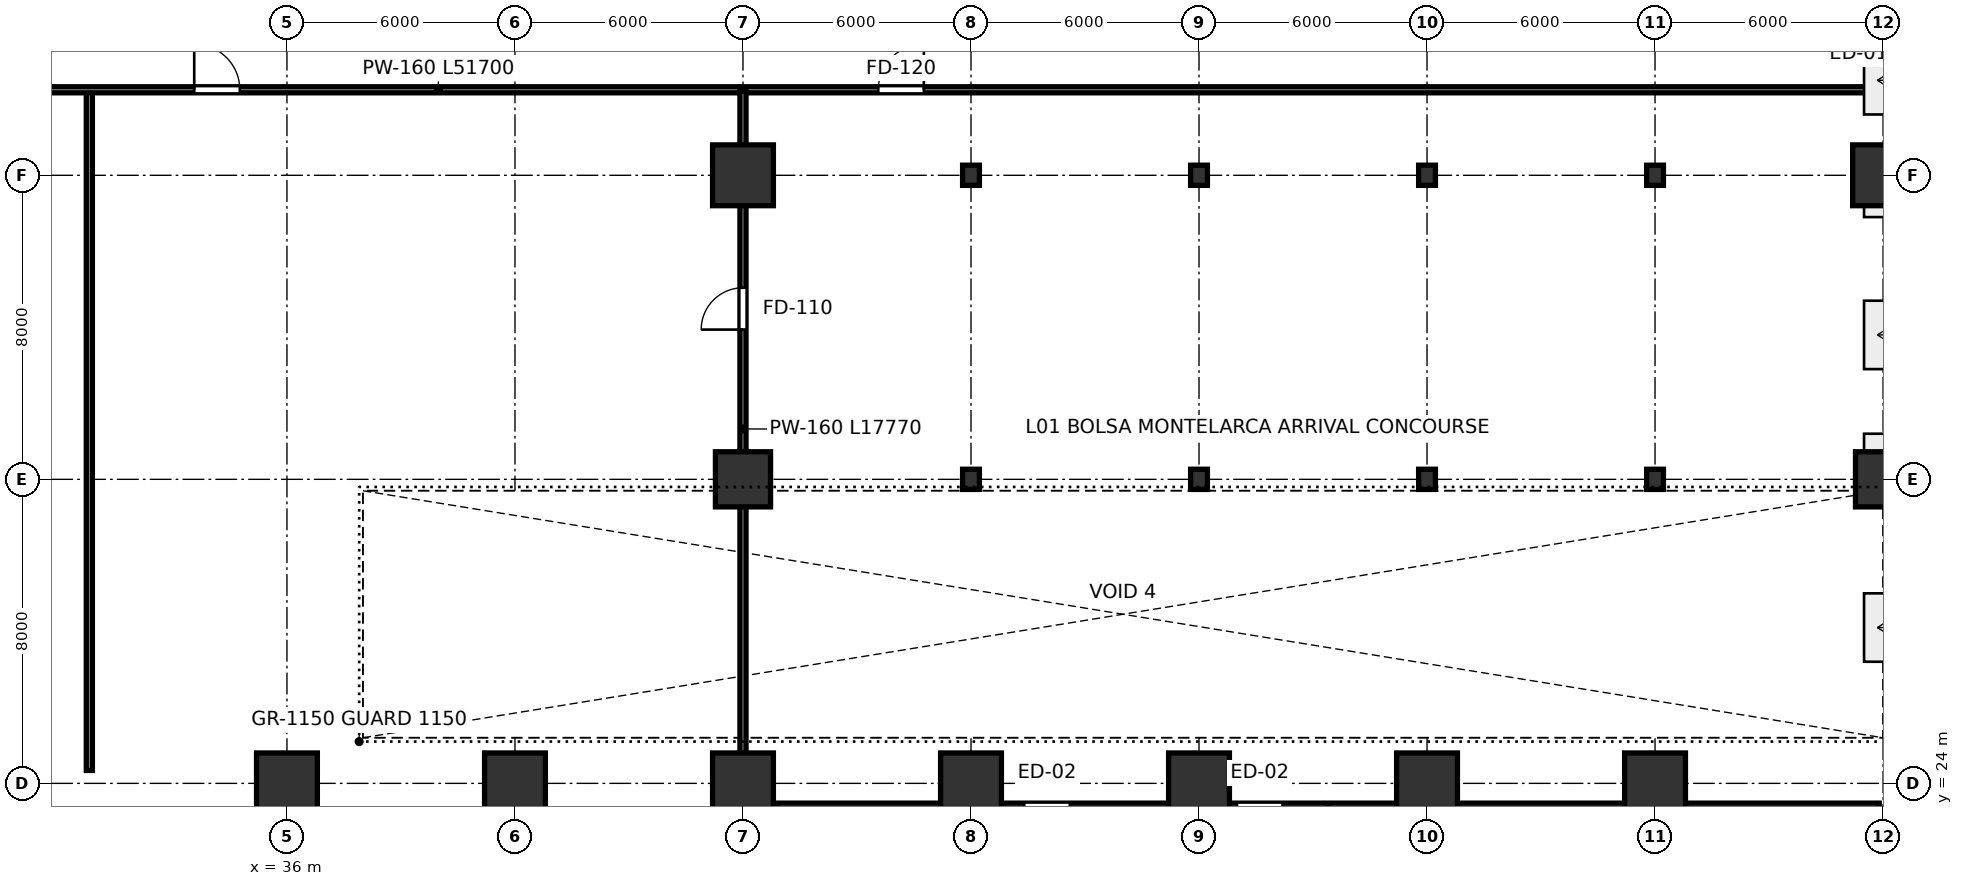
"""IFC4 building model, lengths in metres.
Left out: names, types, materials, properties, quantities, classifications, styles, units other than length and angle.
Written with IfcOpenShell. Run it as: python <this file> out.ifc"""

import sys

from ifc_helpers import new_model, si_unit, direction, frame, frame_2d, origin, origin_2d, place, context, subcontext, project, spatial, rectangle, i_section, extrude, source, transform, mapped, element, fill, save


model = new_model("IFC4")
c1 = context("Model", 3, precision=1e-05, world=origin(), true_north=direction((0.0, 1.0)))
c2 = subcontext(c1, "Body", "Model", "MODEL_VIEW")
j1 = project(units=[si_unit("LENGTHUNIT", "METRE"), si_unit("PLANEANGLEUNIT", "RADIAN")], contexts=[c1])
p1 = place(None, origin())
s1 = spatial("IfcSite", under=j1, at=p1, CompositionType="ELEMENT")
p2 = place(p1, origin())
s2 = spatial("IfcBuilding", under=s1, at=p2, CompositionType="ELEMENT")
p3 = place(p2, origin())
s3 = spatial("IfcBuildingStorey", under=s2, at=p3, CompositionType="ELEMENT", Elevation=0.0)
m1 = source(origin(), c2, "Body", "SweptSolid", [
    extrude(rectangle(XDim=1.6, YDim=1.6, at=origin_2d()), origin(), (0.0, 0.0, 1.0), 5.999),
])
for number, where, z_axis, x_axis in (
    (1, (36.0, 24.0, 0.001), (0.0, 0.0, 1.0), (1.0, 0.0, 0.0)),
    (2, (42.0, 24.0, 0.001), (0.0, 0.0, 1.0), (1.0, 0.0, 0.0)),
    (3, (48.0, 24.0, 0.001), (0.0, 0.0, 1.0), (1.0, 0.0, 0.0)),
):
    element("IfcColumn", number, at=place(p3, frame(where, z_axis=z_axis, x_axis=x_axis)), inside=s3, PredefinedType="COLUMN", context=c2, shape_type="MappedRepresentation", body=[
        mapped(m1, transform((0.0, 0.0, 0.0), scale=1.0)),
    ])
m2 = source(origin(), c2, "Body", "SweptSolid", [
    extrude(rectangle(XDim=1.45, YDim=1.45, at=origin_2d()), origin(), (0.0, 0.0, 1.0), 5.999),
])
p4 = place(p3, frame((48.0, 32.0, 0.001), z_axis=(0.0, 0.0, 1.0), x_axis=(1.0, 0.0, 0.0)))
e4 = element("IfcColumn", 4, at=p4, inside=s3, PredefinedType="COLUMN", context=c2, shape_type="MappedRepresentation", body=[
    mapped(m2, transform((0.0, 0.0, 0.0), scale=1.0)),
])
m3 = source(origin(), c2, "Body", "SweptSolid", [
    extrude(rectangle(XDim=1.6, YDim=1.6, at=origin_2d()), origin(), (0.0, 0.0, 1.0), 5.999),
])
p5 = place(p3, frame((48.0, 40.0, 0.001), z_axis=(0.0, 0.0, 1.0), x_axis=(1.0, 0.0, 0.0)))
e5 = element("IfcColumn", 5, at=p5, inside=s3, PredefinedType="COLUMN", context=c2, shape_type="MappedRepresentation", body=[
    mapped(m3, transform((0.0, 0.0, 0.0), scale=1.0)),
])
p6 = place(p3, frame((54.0, 24.0, 0.001), z_axis=(0.0, 0.0, 1.0), x_axis=(1.0, 0.0, 0.0)))
e6 = element("IfcColumn", 6, at=p6, inside=s3, PredefinedType="COLUMN", context=c2, shape_type="MappedRepresentation", body=[
    mapped(m1, transform((0.0, 0.0, 0.0), scale=1.0)),
])
m4 = source(origin(), c2, "Body", "SweptSolid", [
    extrude(i_section(OverallWidth=0.442, OverallDepth=0.531, WebThickness=0.066, FlangeThickness=0.106, FilletRadius=0.015, at=origin_2d()), origin(), (0.0, 0.0, 1.0), 5.999),
])
for number, where, z_axis, x_axis in (
    (7, (54.0, 32.0, 0.001), (0.0, 0.0, 1.0), (1.0, 0.0, 0.0)),
    (8, (54.0, 40.0, 0.001), (0.0, 0.0, 1.0), (1.0, 0.0, 0.0)),
):
    element("IfcColumn", number, at=place(p3, frame(where, z_axis=z_axis, x_axis=x_axis)), inside=s3, PredefinedType="COLUMN", context=c2, shape_type="MappedRepresentation", body=[
        mapped(m4, transform((0.0, 0.0, 0.0), scale=1.0)),
    ])
p7 = place(p3, frame((60.0, 24.0, 0.001), z_axis=(0.0, 0.0, 1.0), x_axis=(1.0, 0.0, 0.0)))
e9 = element("IfcColumn", 9, at=p7, inside=s3, PredefinedType="COLUMN", context=c2, shape_type="MappedRepresentation", body=[
    mapped(m1, transform((0.0, 0.0, 0.0), scale=1.0)),
])
for number, where, z_axis, x_axis in (
    (10, (60.0, 32.0, 0.001), (0.0, 0.0, 1.0), (1.0, 0.0, 0.0)),
    (11, (60.0, 40.0, 0.001), (0.0, 0.0, 1.0), (1.0, 0.0, 0.0)),
):
    element("IfcColumn", number, at=place(p3, frame(where, z_axis=z_axis, x_axis=x_axis)), inside=s3, PredefinedType="COLUMN", context=c2, shape_type="MappedRepresentation", body=[
        mapped(m4, transform((0.0, 0.0, 0.0), scale=1.0)),
    ])
p8 = place(p3, frame((66.0, 24.0, 0.001), z_axis=(0.0, 0.0, 1.0), x_axis=(1.0, 0.0, 0.0)))
e12 = element("IfcColumn", 12, at=p8, inside=s3, PredefinedType="COLUMN", context=c2, shape_type="MappedRepresentation", body=[
    mapped(m1, transform((0.0, 0.0, 0.0), scale=1.0)),
])
for number, where, z_axis, x_axis in (
    (13, (66.0, 32.0, 0.001), (0.0, 0.0, 1.0), (1.0, 0.0, 0.0)),
    (14, (66.0, 40.0, 0.001), (0.0, 0.0, 1.0), (1.0, 0.0, 0.0)),
):
    element("IfcColumn", number, at=place(p3, frame(where, z_axis=z_axis, x_axis=x_axis)), inside=s3, PredefinedType="COLUMN", context=c2, shape_type="MappedRepresentation", body=[
        mapped(m4, transform((0.0, 0.0, 0.0), scale=1.0)),
    ])
p9 = place(p3, frame((72.0, 24.0, 0.001), z_axis=(0.0, 0.0, 1.0), x_axis=(1.0, 0.0, 0.0)))
e15 = element("IfcColumn", 15, at=p9, inside=s3, PredefinedType="COLUMN", context=c2, shape_type="MappedRepresentation", body=[
    mapped(m1, transform((0.0, 0.0, 0.0), scale=1.0)),
])
for number, where, z_axis, x_axis in (
    (16, (72.0, 32.0, 0.001), (0.0, 0.0, 1.0), (1.0, 0.0, 0.0)),
    (17, (72.0, 40.0, 0.001), (0.0, 0.0, 1.0), (1.0, 0.0, 0.0)),
):
    element("IfcColumn", number, at=place(p3, frame(where, z_axis=z_axis, x_axis=x_axis)), inside=s3, PredefinedType="COLUMN", context=c2, shape_type="MappedRepresentation", body=[
        mapped(m4, transform((0.0, 0.0, 0.0), scale=1.0)),
    ])
m5 = source(origin(), c2, "Body", "SweptSolid", [
    extrude(rectangle(XDim=1.45, YDim=1.45, at=origin_2d()), origin(), (0.0, 0.0, 1.0), 5.999),
])
p10 = place(p3, frame((78.0, 32.0, 0.001), z_axis=(0.0, 0.0, 1.0), x_axis=(1.0, 0.0, 0.0)))
e18 = element("IfcColumn", 18, at=p10, inside=s3, PredefinedType="COLUMN", context=c2, shape_type="MappedRepresentation", body=[
    mapped(m5, transform((0.0, 0.0, 0.0), scale=1.0)),
])
p11 = place(p3, frame((78.0, 40.0, 0.001), z_axis=(0.0, 0.0, 1.0), x_axis=(1.0, 0.0, 0.0)))
e19 = element("IfcColumn", 19, at=p11, inside=s3, PredefinedType="COLUMN", context=c2, shape_type="MappedRepresentation", body=[
    mapped(m1, transform((0.0, 0.0, 0.0), scale=1.0)),
])
p12 = place(p3, frame((77.9, 23.32, 0.0), z_axis=(0.0, 0.0, 1.0), x_axis=(-1.0, 0.0, 0.0)))
e20 = element("IfcWall", 20, at=p12, inside=s3, PredefinedType="SOLIDWALL", context=c2, shape_type="SweptSolid", body=[
    extrude(rectangle(XDim=29.0, YDim=0.32, at=frame_2d((14.5, 0.0))), origin(), (0.0, 0.0, 1.0), 5.74),
])
p13 = place(p12, frame((21.3, 0.0, 0.0)))
e21 = element("IfcOpeningElement", 21, at=p13, cuts=e20, PredefinedType="OPENING", context=c2, shape_type="SweptSolid", body=[
    extrude(rectangle(XDim=1.2, YDim=2.2, at=frame_2d((0.6, 1.1))), frame((0.0, 0.17, 0.0), z_axis=(0.0, -1.0, 0.0), x_axis=(1.0, 0.0, 0.0)), (0.0, 0.0, 1.0), 0.34),
])
p14 = place(p12, frame((15.7, 0.0, 0.0)))
e22 = element("IfcOpeningElement", 22, at=p14, cuts=e20, PredefinedType="OPENING", context=c2, shape_type="SweptSolid", body=[
    extrude(rectangle(XDim=1.2, YDim=2.2, at=frame_2d((0.6, 1.1))), frame((0.0, 0.17, 0.0), z_axis=(0.0, -1.0, 0.0), x_axis=(1.0, 0.0, 0.0)), (0.0, 0.0, 1.0), 0.34),
])
p15 = place(p3, frame((30.8, 24.34, 0.0), z_axis=(0.0, 0.0, 1.0), x_axis=(0.0, 1.0, 0.0)))
e23 = element("IfcWall", 23, at=p15, inside=s3, PredefinedType="PARTITIONING", context=c2, shape_type="SweptSolid", body=[
    extrude(rectangle(XDim=17.87, YDim=0.16, at=frame_2d((8.935, 0.0))), origin(), (0.0, 0.0, 1.0), 4.025),
])
p16 = place(p3, frame((27.06, 42.25, 0.0), z_axis=(0.0, 0.0, 1.0), x_axis=(1.0, 0.0, 0.0)))
e24 = element("IfcWall", 24, at=p16, inside=s3, PredefinedType="PARTITIONING", context=c2, shape_type="SweptSolid", body=[
    extrude(rectangle(XDim=51.7, YDim=0.16, at=frame_2d((25.85, 0.0))), origin(), (0.0, 0.0, 1.0), 4.875),
])
p17 = place(p16, frame((6.5, 0.0, 0.0)))
e25 = element("IfcOpeningElement", 25, at=p17, cuts=e24, PredefinedType="OPENING", context=c2, shape_type="SweptSolid", body=[
    extrude(rectangle(XDim=1.2, YDim=2.2, at=frame_2d((0.6, 1.1))), frame((0.0, 0.09, 0.0), z_axis=(0.0, -1.0, 0.0), x_axis=(1.0, 0.0, 0.0)), (0.0, 0.0, 1.0), 0.18),
])
p18 = place(p16, frame((24.5, 0.0, 0.0)))
e26 = element("IfcOpeningElement", 26, at=p18, cuts=e24, PredefinedType="OPENING", context=c2, shape_type="SweptSolid", body=[
    extrude(rectangle(XDim=1.2, YDim=2.2, at=frame_2d((0.6, 1.1))), frame((0.0, 0.09, 0.0), z_axis=(0.0, -1.0, 0.0), x_axis=(1.0, 0.0, 0.0)), (0.0, 0.0, 1.0), 0.18),
])
p19 = place(p3, frame((48.0, 24.44, 0.0), z_axis=(0.0, 0.0, 1.0), x_axis=(0.0, 1.0, 0.0)))
e27 = element("IfcWall", 27, at=p19, inside=s3, PredefinedType="PARTITIONING", context=c2, shape_type="SweptSolid", body=[
    extrude(rectangle(XDim=17.77, YDim=0.16, at=frame_2d((8.885, 0.0))), origin(), (0.0, 0.0, 1.0), 4.025),
])
p20 = place(p19, frame((11.5, 0.0, 0.0)))
e28 = element("IfcOpeningElement", 28, at=p20, cuts=e27, PredefinedType="OPENING", context=c2, shape_type="SweptSolid", body=[
    extrude(rectangle(XDim=1.1, YDim=2.2, at=frame_2d((0.55, 1.1))), frame((0.0, 0.09, 0.0), z_axis=(0.0, -1.0, 0.0), x_axis=(1.0, 0.0, 0.0)), (0.0, 0.0, 1.0), 0.18),
])
m6 = source(origin(), c2, "Body", "SweptSolid", [
    extrude(rectangle(XDim=1.2, YDim=2.2, at=frame_2d((0.6, 1.1))), frame((0.0, 0.025, 0.0), z_axis=(0.0, -1.0, 0.0), x_axis=(1.0, 0.0, 0.0)), (0.0, 0.0, 1.0), 0.05),
])
p21 = place(p17, origin())
e29 = element("IfcDoor", 29, at=p21, inside=s3, OperationType="SINGLE_SWING_LEFT", PredefinedType="DOOR", context=c2, shape_type="MappedRepresentation", body=[
    mapped(m6, transform((0.0, 0.0, 0.0), scale=1.0)),
])
fill(e25, e29)
p22 = place(p18, origin())
e30 = element("IfcDoor", 30, at=p22, inside=s3, OperationType="SINGLE_SWING_RIGHT", PredefinedType="DOOR", context=c2, shape_type="MappedRepresentation", body=[
    mapped(m6, transform((0.0, 0.0, 0.0), scale=1.0)),
])
fill(e26, e30)
m7 = source(origin(), c2, "Body", "SweptSolid", [
    extrude(rectangle(XDim=1.1, YDim=2.2, at=frame_2d((0.55, 1.1))), frame((0.0, 0.025, 0.0), z_axis=(0.0, -1.0, 0.0), x_axis=(1.0, 0.0, 0.0)), (0.0, 0.0, 1.0), 0.05),
])
p23 = place(p20, origin())
e31 = element("IfcDoor", 31, at=p23, inside=s3, OperationType="SINGLE_SWING_LEFT", PredefinedType="DOOR", context=c2, shape_type="MappedRepresentation", body=[
    mapped(m7, transform((0.0, 0.0, 0.0), scale=1.0)),
])
fill(e28, e31)
save(model, sys.argv[1])
